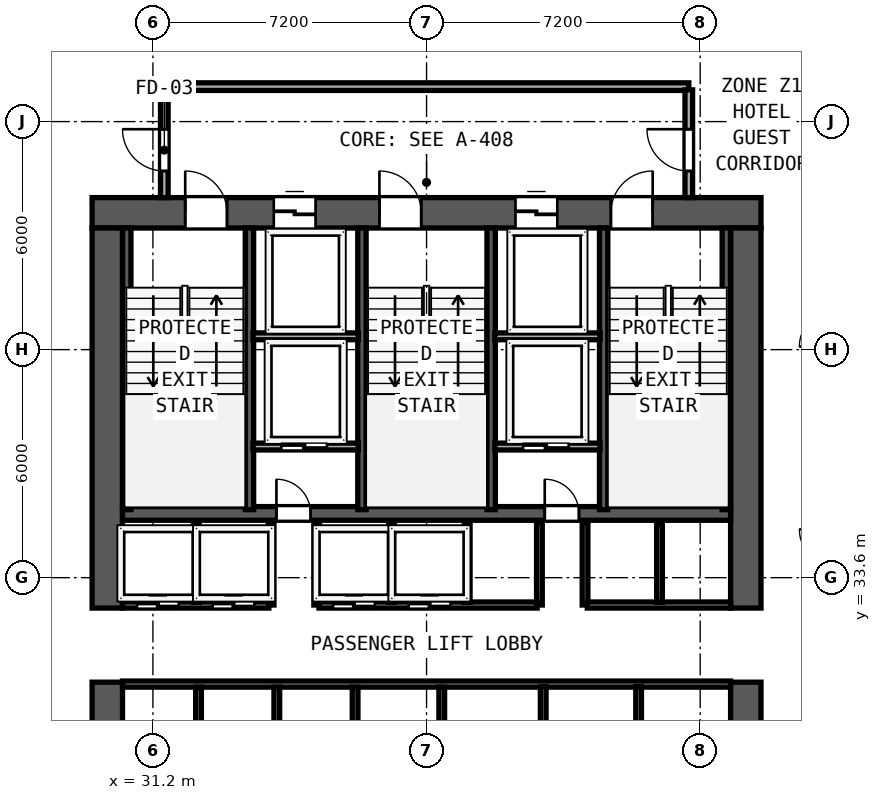
"""IFC4 building model, lengths in metres.
Left out: names, types, materials, properties, quantities, classifications, styles, units other than length and angle.
Written with IfcOpenShell. Run it as: python <this file> out.ifc"""

import sys

from ifc_helpers import new_model, si_unit, direction, frame, frame_2d, origin, place, context, subcontext, project, spatial, rectangle, extrude, element, fill, save


model = new_model("IFC4")
c1 = context("Model", 3, precision=1e-05, world=origin(), true_north=direction((0.0, 1.0)))
c2 = subcontext(c1, "Body", "Model", "MODEL_VIEW")
j1 = project(units=[si_unit("LENGTHUNIT", "METRE"), si_unit("PLANEANGLEUNIT", "RADIAN")], contexts=[c1])
p1 = place(None, origin())
s1 = spatial("IfcSite", under=j1, at=p1, CompositionType="ELEMENT")
p2 = place(p1, origin())
s2 = spatial("IfcBuilding", under=s1, at=p2, CompositionType="ELEMENT")
p3 = place(p2, frame((0.0, 0.0, 62.8)))
s3 = spatial("IfcBuildingStorey", under=s2, at=p3, CompositionType="ELEMENT", Elevation=62.8)
p4 = place(p3, frame((29.6, 43.2, 0.0), z_axis=(0.0, 0.0, 1.0), x_axis=(1.0, 0.0, 0.0)))
e1 = element("IfcWall", 1, at=p4, inside=s3, PredefinedType="SHEAR", context=c2, shape_type="SweptSolid", body=[
    extrude(rectangle(XDim=17.6, YDim=0.8, at=frame_2d((8.8, 0.0))), origin(), (0.0, 0.0, 1.0), 3.6),
])
p5 = place(p4, frame((2.45, 0.0, 0.0)))
e2 = element("IfcOpeningElement", 2, at=p5, cuts=e1, PredefinedType="OPENING", context=c2, shape_type="SweptSolid", body=[
    extrude(rectangle(XDim=1.1, YDim=2.15, at=frame_2d((0.55, 1.075))), frame((0.0, 0.41, 0.0), z_axis=(0.0, -1.0, 0.0), x_axis=(1.0, 0.0, 0.0)), (0.0, 0.0, 1.0), 0.82),
])
p6 = place(p4, frame((7.56, 0.0, 0.0)))
e3 = element("IfcOpeningElement", 3, at=p6, cuts=e1, PredefinedType="OPENING", context=c2, shape_type="SweptSolid", body=[
    extrude(rectangle(XDim=1.1, YDim=2.15, at=frame_2d((0.55, 1.075))), frame((0.0, 0.41, 0.0), z_axis=(0.0, -1.0, 0.0), x_axis=(1.0, 0.0, 0.0)), (0.0, 0.0, 1.0), 0.82),
])
p7 = place(p4, frame((13.65, 0.0, 0.0)))
e4 = element("IfcOpeningElement", 4, at=p7, cuts=e1, PredefinedType="OPENING", context=c2, shape_type="SweptSolid", body=[
    extrude(rectangle(XDim=1.1, YDim=2.15, at=frame_2d((0.55, 1.075))), frame((0.0, 0.41, 0.0), z_axis=(0.0, -1.0, 0.0), x_axis=(1.0, 0.0, 0.0)), (0.0, 0.0, 1.0), 0.82),
])
p8 = place(p4, frame((4.78, 0.0, 0.0)))
e5 = element("IfcOpeningElement", 5, at=p8, cuts=e1, PredefinedType="OPENING", context=c2, shape_type="SweptSolid", body=[
    extrude(rectangle(XDim=1.1, YDim=2.2, at=frame_2d((0.55, 1.1))), frame((0.0, 0.41, 0.0), z_axis=(0.0, -1.0, 0.0), x_axis=(1.0, 0.0, 0.0)), (0.0, 0.0, 1.0), 0.82),
])
p9 = place(p4, frame((11.14, 0.0, 0.0)))
e6 = element("IfcOpeningElement", 6, at=p9, cuts=e1, PredefinedType="OPENING", context=c2, shape_type="SweptSolid", body=[
    extrude(rectangle(XDim=1.1, YDim=2.2, at=frame_2d((0.55, 1.1))), frame((0.0, 0.41, 0.0), z_axis=(0.0, -1.0, 0.0), x_axis=(1.0, 0.0, 0.0)), (0.0, 0.0, 1.0), 0.82),
])
p10 = place(p3, frame((30.0, 26.8, 0.0), z_axis=(0.0, 0.0, 1.0), x_axis=(0.0, 1.0, 0.0)))
e7 = element("IfcWall", 7, at=p10, inside=s3, PredefinedType="SHEAR", context=c2, shape_type="SweptSolid", body=[
    extrude(rectangle(XDim=4.05, YDim=0.8, at=frame_2d((2.025, 0.0))), origin(), (0.0, 0.0, 1.0), 3.6),
])
p11 = place(p3, frame((30.0, 32.8, 0.0), z_axis=(0.0, 0.0, 1.0), x_axis=(0.0, 1.0, 0.0)))
e8 = element("IfcWall", 8, at=p11, inside=s3, PredefinedType="SHEAR", context=c2, shape_type="SweptSolid", body=[
    extrude(rectangle(XDim=10.0, YDim=0.8, at=frame_2d((5.0, 0.0))), origin(), (0.0, 0.0, 1.0), 3.6),
])
p12 = place(p3, frame((46.8, 26.8, 0.0), z_axis=(0.0, 0.0, 1.0), x_axis=(0.0, 1.0, 0.0)))
e9 = element("IfcWall", 9, at=p12, inside=s3, PredefinedType="SHEAR", context=c2, shape_type="SweptSolid", body=[
    extrude(rectangle(XDim=4.05, YDim=0.8, at=frame_2d((2.025, 0.0))), origin(), (0.0, 0.0, 1.0), 3.6),
])
p13 = place(p3, frame((46.8, 32.8, 0.0), z_axis=(0.0, 0.0, 1.0), x_axis=(0.0, 1.0, 0.0)))
e10 = element("IfcWall", 10, at=p13, inside=s3, PredefinedType="SHEAR", context=c2, shape_type="SweptSolid", body=[
    extrude(rectangle(XDim=10.0, YDim=0.8, at=frame_2d((5.0, 0.0))), origin(), (0.0, 0.0, 1.0), 3.6),
])
p14 = place(p3, frame((30.4, 35.29, 0.0), z_axis=(0.0, 0.0, 1.0), x_axis=(1.0, 0.0, 0.0)))
e11 = element("IfcWall", 11, at=p14, inside=s3, PredefinedType="SHEAR", context=c2, shape_type="SweptSolid", body=[
    extrude(rectangle(XDim=16.0, YDim=0.36, at=frame_2d((8.0, 0.0))), origin(), (0.0, 0.0, 1.0), 3.6),
])
p15 = place(p14, frame((4.95, 0.0, 0.0), z_axis=(0.0, 0.0, 1.0), x_axis=(-1.0, 0.0, 0.0)))
e12 = element("IfcOpeningElement", 12, at=p15, cuts=e11, PredefinedType="OPENING", context=c2, shape_type="SweptSolid", body=[
    extrude(rectangle(XDim=0.9, YDim=2.1, at=frame_2d((0.45, 1.05))), frame((0.0, 0.19, 0.0), z_axis=(0.0, -1.0, 0.0), x_axis=(1.0, 0.0, 0.0)), (0.0, 0.0, 1.0), 0.38),
])
p16 = place(p14, frame((12.01, 0.0, 0.0), z_axis=(0.0, 0.0, 1.0), x_axis=(-1.0, 0.0, 0.0)))
e13 = element("IfcOpeningElement", 13, at=p16, cuts=e11, PredefinedType="OPENING", context=c2, shape_type="SweptSolid", body=[
    extrude(rectangle(XDim=0.9, YDim=2.1, at=frame_2d((0.45, 1.05))), frame((0.0, 0.19, 0.0), z_axis=(0.0, -1.0, 0.0), x_axis=(1.0, 0.0, 0.0)), (0.0, 0.0, 1.0), 0.38),
])
for number, where, z_axis, x_axis in (
    (14, (30.512, 35.39, 0.0), (0.0, 0.0, 1.0), (0.0, 1.0, 0.0)),
    (15, (33.74, 35.39, 0.0), (0.0, 0.0, 1.0), (0.0, 1.0, 0.0)),
    (16, (36.7, 35.39, 0.0), (0.0, 0.0, 1.0), (0.0, 1.0, 0.0)),
    (17, (40.1, 35.39, 0.0), (0.0, 0.0, 1.0), (0.0, 1.0, 0.0)),
    (18, (43.06, 35.39, 0.0), (0.0, 0.0, 1.0), (0.0, 1.0, 0.0)),
    (19, (46.288, 35.39, 0.0), (0.0, 0.0, 1.0), (0.0, 1.0, 0.0)),
):
    element("IfcWall", number, at=place(p3, frame(where, z_axis=z_axis, x_axis=x_axis)), inside=s3, PredefinedType="SHEAR", context=c2, shape_type="SweptSolid", body=[
        extrude(rectangle(XDim=7.41, YDim=0.22, at=frame_2d((3.705, 0.0))), origin(), (0.0, 0.0, 1.0), 3.6),
    ])
p17 = place(p3, frame((31.5, 46.52, 0.0), z_axis=(0.0, 0.0, 1.0), x_axis=(1.0, 0.0, 0.0)))
e20 = element("IfcWall", 20, at=p17, inside=s3, PredefinedType="SOLIDWALL", context=c2, shape_type="SweptSolid", body=[
    extrude(rectangle(XDim=13.8, YDim=0.2, at=frame_2d((6.9, 0.0))), origin(), (0.0, 0.0, 1.0), 3.6),
])
p18 = place(p3, frame((31.5, 43.6, 0.0), z_axis=(0.0, 0.0, 1.0), x_axis=(0.0, 1.0, 0.0)))
e21 = element("IfcWall", 21, at=p18, inside=s3, PredefinedType="SOLIDWALL", context=c2, shape_type="SweptSolid", body=[
    extrude(rectangle(XDim=2.835, YDim=0.2, at=frame_2d((1.417, 0.0))), origin(), (0.0, 0.0, 1.0), 3.6),
])
p19 = place(p18, frame((1.8, 0.0, 0.0), z_axis=(0.0, 0.0, 1.0), x_axis=(-1.0, 0.0, 0.0)))
e22 = element("IfcOpeningElement", 22, at=p19, cuts=e21, PredefinedType="OPENING", context=c2, shape_type="SweptSolid", body=[
    extrude(rectangle(XDim=1.1, YDim=2.15, at=frame_2d((0.55, 1.075))), frame((0.0, 0.11, 0.0), z_axis=(0.0, -1.0, 0.0), x_axis=(1.0, 0.0, 0.0)), (0.0, 0.0, 1.0), 0.22),
])
p20 = place(p3, frame((45.3, 43.6, 0.0), z_axis=(0.0, 0.0, 1.0), x_axis=(0.0, 1.0, 0.0)))
e23 = element("IfcWall", 23, at=p20, inside=s3, PredefinedType="SOLIDWALL", context=c2, shape_type="SweptSolid", body=[
    extrude(rectangle(XDim=2.835, YDim=0.2, at=frame_2d((1.417, 0.0))), origin(), (0.0, 0.0, 1.0), 3.6),
])
p21 = place(p20, frame((0.7, 0.0, 0.0)))
e24 = element("IfcOpeningElement", 24, at=p21, cuts=e23, PredefinedType="OPENING", context=c2, shape_type="SweptSolid", body=[
    extrude(rectangle(XDim=1.1, YDim=2.15, at=frame_2d((0.55, 1.075))), frame((0.0, 0.11, 0.0), z_axis=(0.0, -1.0, 0.0), x_axis=(1.0, 0.0, 0.0)), (0.0, 0.0, 1.0), 0.22),
])
for number, where, z_axis, x_axis in (
    (25, (33.835, 39.95, 0.0), (0.0, 0.0, 1.0), (1.0, 0.0, 0.0)),
    (26, (40.195, 39.95, 0.0), (0.0, 0.0, 1.0), (1.0, 0.0, 0.0)),
):
    element("IfcWall", number, at=place(p3, frame(where, z_axis=z_axis, x_axis=x_axis)), inside=s3, PredefinedType="SOLIDWALL", context=c2, shape_type="SweptSolid", body=[
        extrude(rectangle(XDim=2.77, YDim=0.18, at=frame_2d((1.385, 0.0))), origin(), (0.0, 0.0, 1.0), 3.6),
    ])
p22 = place(p3, frame((33.835, 37.05, 0.0), z_axis=(0.0, 0.0, 1.0), x_axis=(1.0, 0.0, 0.0)))
e27 = element("IfcWall", 27, at=p22, inside=s3, PredefinedType="SOLIDWALL", context=c2, shape_type="SweptSolid", body=[
    extrude(rectangle(XDim=2.77, YDim=0.18, at=frame_2d((1.385, 0.0))), origin(), (0.0, 0.0, 1.0), 3.6),
])
p23 = place(p22, frame((1.945, 0.0, 0.0), z_axis=(0.0, 0.0, 1.0), x_axis=(-1.0, 0.0, 0.0)))
e28 = element("IfcOpeningElement", 28, at=p23, cuts=e27, PredefinedType="OPENING", context=c2, shape_type="SweptSolid", body=[
    extrude(rectangle(XDim=1.2, YDim=2.2, at=frame_2d((0.6, 1.1))), frame((0.0, 0.1, 0.0), z_axis=(0.0, -1.0, 0.0), x_axis=(1.0, 0.0, 0.0)), (0.0, 0.0, 1.0), 0.2),
])
for number, where, z_axis, x_axis in (
    (29, (34.31, 32.88, 0.0), (0.0, 0.0, 1.0), (0.0, 1.0, 0.0)),
    (30, (35.51, 32.88, 0.0), (0.0, 0.0, 1.0), (0.0, 1.0, 0.0)),
):
    element("IfcWall", number, at=place(p3, frame(where, z_axis=z_axis, x_axis=x_axis)), inside=s3, PredefinedType="SOLIDWALL", context=c2, shape_type="SweptSolid", body=[
        extrude(rectangle(XDim=2.17, YDim=0.15, at=frame_2d((1.085, 0.0))), origin(), (0.0, 0.0, 1.0), 3.6),
    ])
p24 = place(p3, frame((40.195, 37.05, 0.0), z_axis=(0.0, 0.0, 1.0), x_axis=(1.0, 0.0, 0.0)))
e31 = element("IfcWall", 31, at=p24, inside=s3, PredefinedType="SOLIDWALL", context=c2, shape_type="SweptSolid", body=[
    extrude(rectangle(XDim=2.77, YDim=0.18, at=frame_2d((1.385, 0.0))), origin(), (0.0, 0.0, 1.0), 3.6),
])
p25 = place(p24, frame((1.945, 0.0, 0.0), z_axis=(0.0, 0.0, 1.0), x_axis=(-1.0, 0.0, 0.0)))
e32 = element("IfcOpeningElement", 32, at=p25, cuts=e31, PredefinedType="OPENING", context=c2, shape_type="SweptSolid", body=[
    extrude(rectangle(XDim=1.2, YDim=2.2, at=frame_2d((0.6, 1.1))), frame((0.0, 0.1, 0.0), z_axis=(0.0, -1.0, 0.0), x_axis=(1.0, 0.0, 0.0)), (0.0, 0.0, 1.0), 0.2),
])
for number, where, z_axis, x_axis in (
    (33, (41.37, 32.88, 0.0), (0.0, 0.0, 1.0), (0.0, 1.0, 0.0)),
    (34, (42.57, 32.88, 0.0), (0.0, 0.0, 1.0), (0.0, 1.0, 0.0)),
):
    element("IfcWall", number, at=place(p3, frame(where, z_axis=z_axis, x_axis=x_axis)), inside=s3, PredefinedType="SOLIDWALL", context=c2, shape_type="SweptSolid", body=[
        extrude(rectangle(XDim=2.17, YDim=0.15, at=frame_2d((1.085, 0.0))), origin(), (0.0, 0.0, 1.0), 3.6),
    ])
p26 = place(p3, frame((30.4, 32.88, 0.0), z_axis=(0.0, 0.0, 1.0), x_axis=(1.0, 0.0, 0.0)))
e35 = element("IfcWall", 35, at=p26, inside=s3, PredefinedType="SOLIDWALL", context=c2, shape_type="SweptSolid", body=[
    extrude(rectangle(XDim=3.85, YDim=0.16, at=frame_2d((1.925, 0.0))), origin(), (0.0, 0.0, 1.0), 3.6),
])
p27 = place(p26, frame((1.48, 0.0, 0.0), z_axis=(0.0, 0.0, 1.0), x_axis=(-1.0, 0.0, 0.0)))
e36 = element("IfcOpeningElement", 36, at=p27, cuts=e35, PredefinedType="OPENING", context=c2, shape_type="SweptSolid", body=[
    extrude(rectangle(XDim=1.1, YDim=2.2, at=frame_2d((0.55, 1.1))), frame((0.0, 0.09, 0.0), z_axis=(0.0, -1.0, 0.0), x_axis=(1.0, 0.0, 0.0)), (0.0, 0.0, 1.0), 0.18),
])
p28 = place(p26, frame((3.47, 0.0, 0.0), z_axis=(0.0, 0.0, 1.0), x_axis=(-1.0, 0.0, 0.0)))
e37 = element("IfcOpeningElement", 37, at=p28, cuts=e35, PredefinedType="OPENING", context=c2, shape_type="SweptSolid", body=[
    extrude(rectangle(XDim=1.1, YDim=2.2, at=frame_2d((0.55, 1.1))), frame((0.0, 0.09, 0.0), z_axis=(0.0, -1.0, 0.0), x_axis=(1.0, 0.0, 0.0)), (0.0, 0.0, 1.0), 0.18),
])
p29 = place(p3, frame((35.57, 32.88, 0.0), z_axis=(0.0, 0.0, 1.0), x_axis=(1.0, 0.0, 0.0)))
e38 = element("IfcWall", 38, at=p29, inside=s3, PredefinedType="SOLIDWALL", context=c2, shape_type="SweptSolid", body=[
    extrude(rectangle(XDim=5.74, YDim=0.16, at=frame_2d((2.87, 0.0))), origin(), (0.0, 0.0, 1.0), 3.6),
])
p30 = place(p29, frame((1.47, 0.0, 0.0), z_axis=(0.0, 0.0, 1.0), x_axis=(-1.0, 0.0, 0.0)))
e39 = element("IfcOpeningElement", 39, at=p30, cuts=e38, PredefinedType="OPENING", context=c2, shape_type="SweptSolid", body=[
    extrude(rectangle(XDim=1.1, YDim=2.2, at=frame_2d((0.55, 1.1))), frame((0.0, 0.09, 0.0), z_axis=(0.0, -1.0, 0.0), x_axis=(1.0, 0.0, 0.0)), (0.0, 0.0, 1.0), 0.18),
])
p31 = place(p29, frame((3.46, 0.0, 0.0), z_axis=(0.0, 0.0, 1.0), x_axis=(-1.0, 0.0, 0.0)))
e40 = element("IfcOpeningElement", 40, at=p31, cuts=e38, PredefinedType="OPENING", context=c2, shape_type="SweptSolid", body=[
    extrude(rectangle(XDim=1.1, YDim=2.2, at=frame_2d((0.55, 1.1))), frame((0.0, 0.09, 0.0), z_axis=(0.0, -1.0, 0.0), x_axis=(1.0, 0.0, 0.0)), (0.0, 0.0, 1.0), 0.18),
])
p32 = place(p3, frame((42.63, 32.88, 0.0), z_axis=(0.0, 0.0, 1.0), x_axis=(1.0, 0.0, 0.0)))
e41 = element("IfcWall", 41, at=p32, inside=s3, PredefinedType="SOLIDWALL", context=c2, shape_type="SweptSolid", body=[
    extrude(rectangle(XDim=3.77, YDim=0.16, at=frame_2d((1.885, 0.0))), origin(), (0.0, 0.0, 1.0), 3.6),
])
for number, where, z_axis, x_axis in (
    (42, (32.34, 32.95, 0.0), (0.0, 0.0, 1.0), (0.0, 1.0, 0.0)),
    (43, (37.48, 32.95, 0.0), (0.0, 0.0, 1.0), (0.0, 1.0, 0.0)),
    (44, (39.47, 32.95, 0.0), (0.0, 0.0, 1.0), (0.0, 1.0, 0.0)),
    (45, (44.53, 32.95, 0.0), (0.0, 0.0, 1.0), (0.0, 1.0, 0.0)),
):
    element("IfcWall", number, at=place(p3, frame(where, z_axis=z_axis, x_axis=x_axis)), inside=s3, PredefinedType="SOLIDWALL", context=c2, shape_type="SweptSolid", body=[
        extrude(rectangle(XDim=2.05, YDim=0.15, at=frame_2d((1.025, 0.0))), origin(), (0.0, 0.0, 1.0), 3.6),
    ])
p33 = place(p3, frame((30.4, 30.8, 0.0), z_axis=(0.0, 0.0, 1.0), x_axis=(1.0, 0.0, 0.0)))
e46 = element("IfcWall", 46, at=p33, inside=s3, PredefinedType="SOLIDWALL", context=c2, shape_type="SweptSolid", body=[
    extrude(rectangle(XDim=16.0, YDim=0.16, at=frame_2d((8.0, 0.0))), origin(), (0.0, 0.0, 1.0), 3.6),
])
for number, where, z_axis, x_axis in (
    (47, (32.4, 28.735, 0.0), (0.0, 0.0, 1.0), (0.0, 1.0, 0.0)),
    (48, (34.46, 28.735, 0.0), (0.0, 0.0, 1.0), (0.0, 1.0, 0.0)),
    (49, (36.52, 28.735, 0.0), (0.0, 0.0, 1.0), (0.0, 1.0, 0.0)),
    (50, (38.8, 28.735, 0.0), (0.0, 0.0, 1.0), (0.0, 1.0, 0.0)),
):
    element("IfcWall", number, at=place(p3, frame(where, z_axis=z_axis, x_axis=x_axis)), inside=s3, PredefinedType="SOLIDWALL", context=c2, shape_type="SweptSolid", body=[
        extrude(rectangle(XDim=1.985, YDim=0.15, at=frame_2d((0.992, 0.0))), origin(), (0.0, 0.0, 1.0), 3.6),
    ])
for number, where, z_axis, x_axis in (
    (51, (41.47, 28.75, 0.0), (0.0, 0.0, 1.0), (0.0, 1.0, 0.0)),
    (52, (43.98, 28.75, 0.0), (0.0, 0.0, 1.0), (0.0, 1.0, 0.0)),
):
    element("IfcWall", number, at=place(p3, frame(where, z_axis=z_axis, x_axis=x_axis)), inside=s3, PredefinedType="SOLIDWALL", context=c2, shape_type="SweptSolid", body=[
        extrude(rectangle(XDim=1.985, YDim=0.15, at=frame_2d((0.993, 0.0))), origin(), (0.0, 0.0, 1.0), 3.6),
    ])
p34 = place(p5, origin())
e53 = element("IfcDoor", 53, at=p34, inside=s3, OperationType="SINGLE_SWING_LEFT", PredefinedType="DOOR", context=c2, shape_type="SweptSolid", body=[
    extrude(rectangle(XDim=1.1, YDim=2.15, at=frame_2d((0.55, 1.075))), frame((0.0, 0.185, 0.0), z_axis=(0.0, -1.0, 0.0), x_axis=(1.0, 0.0, 0.0)), (0.0, 0.0, 1.0), 0.05),
])
fill(e2, e53)
p35 = place(p6, origin())
e54 = element("IfcDoor", 54, at=p35, inside=s3, OperationType="SINGLE_SWING_LEFT", PredefinedType="DOOR", context=c2, shape_type="SweptSolid", body=[
    extrude(rectangle(XDim=1.1, YDim=2.15, at=frame_2d((0.55, 1.075))), frame((0.0, 0.185, 0.0), z_axis=(0.0, -1.0, 0.0), x_axis=(1.0, 0.0, 0.0)), (0.0, 0.0, 1.0), 0.05),
])
fill(e3, e54)
p36 = place(p7, origin())
e55 = element("IfcDoor", 55, at=p36, inside=s3, OperationType="SINGLE_SWING_RIGHT", PredefinedType="DOOR", context=c2, shape_type="SweptSolid", body=[
    extrude(rectangle(XDim=1.1, YDim=2.15, at=frame_2d((0.55, 1.075))), frame((0.0, 0.185, 0.0), z_axis=(0.0, -1.0, 0.0), x_axis=(1.0, 0.0, 0.0)), (0.0, 0.0, 1.0), 0.05),
])
fill(e4, e55)
p37 = place(p19, origin())
e56 = element("IfcDoor", 56, at=p37, inside=s3, OperationType="SINGLE_SWING_LEFT", PredefinedType="DOOR", context=c2, shape_type="SweptSolid", body=[
    extrude(rectangle(XDim=1.1, YDim=2.15, at=frame_2d((0.55, 1.075))), frame((0.0, 0.025, 0.0), z_axis=(0.0, -1.0, 0.0), x_axis=(1.0, 0.0, 0.0)), (0.0, 0.0, 1.0), 0.05),
])
fill(e22, e56)
p38 = place(p21, origin())
e57 = element("IfcDoor", 57, at=p38, inside=s3, OperationType="SINGLE_SWING_RIGHT", PredefinedType="DOOR", context=c2, shape_type="SweptSolid", body=[
    extrude(rectangle(XDim=1.1, YDim=2.15, at=frame_2d((0.55, 1.075))), frame((0.0, 0.025, 0.0), z_axis=(0.0, -1.0, 0.0), x_axis=(1.0, 0.0, 0.0)), (0.0, 0.0, 1.0), 0.05),
])
fill(e24, e57)
p39 = place(p8, origin())
e58 = element("IfcDoor", 58, at=p39, inside=s3, OperationType="SLIDING_TO_LEFT", PredefinedType="DOOR", context=c2, shape_type="SweptSolid", body=[
    extrude(rectangle(XDim=1.1, YDim=2.2, at=frame_2d((0.55, 1.1))), frame((0.0, 0.185, 0.0), z_axis=(0.0, -1.0, 0.0), x_axis=(1.0, 0.0, 0.0)), (0.0, 0.0, 1.0), 0.05),
])
fill(e5, e58)
p40 = place(p9, origin())
e59 = element("IfcDoor", 59, at=p40, inside=s3, OperationType="SLIDING_TO_LEFT", PredefinedType="DOOR", context=c2, shape_type="SweptSolid", body=[
    extrude(rectangle(XDim=1.1, YDim=2.2, at=frame_2d((0.55, 1.1))), frame((0.0, 0.185, 0.0), z_axis=(0.0, -1.0, 0.0), x_axis=(1.0, 0.0, 0.0)), (0.0, 0.0, 1.0), 0.05),
])
fill(e6, e59)
p41 = place(p23, origin())
e60 = element("IfcDoor", 60, at=p41, inside=s3, OperationType="SLIDING_TO_RIGHT", PredefinedType="DOOR", context=c2, shape_type="SweptSolid", body=[
    extrude(rectangle(XDim=1.2, YDim=2.2, at=frame_2d((0.6, 1.1))), frame((0.0, 0.025, 0.0), z_axis=(0.0, -1.0, 0.0), x_axis=(1.0, 0.0, 0.0)), (0.0, 0.0, 1.0), 0.05),
])
fill(e28, e60)
p42 = place(p15, origin())
e61 = element("IfcDoor", 61, at=p42, inside=s3, OperationType="SINGLE_SWING_RIGHT", PredefinedType="DOOR", context=c2, shape_type="SweptSolid", body=[
    extrude(rectangle(XDim=0.9, YDim=2.1, at=frame_2d((0.45, 1.05))), frame((0.0, 0.025, 0.0), z_axis=(0.0, -1.0, 0.0), x_axis=(1.0, 0.0, 0.0)), (0.0, 0.0, 1.0), 0.05),
])
fill(e12, e61)
p43 = place(p25, origin())
e62 = element("IfcDoor", 62, at=p43, inside=s3, OperationType="SLIDING_TO_RIGHT", PredefinedType="DOOR", context=c2, shape_type="SweptSolid", body=[
    extrude(rectangle(XDim=1.2, YDim=2.2, at=frame_2d((0.6, 1.1))), frame((0.0, 0.025, 0.0), z_axis=(0.0, -1.0, 0.0), x_axis=(1.0, 0.0, 0.0)), (0.0, 0.0, 1.0), 0.05),
])
fill(e32, e62)
p44 = place(p16, origin())
e63 = element("IfcDoor", 63, at=p44, inside=s3, OperationType="SINGLE_SWING_RIGHT", PredefinedType="DOOR", context=c2, shape_type="SweptSolid", body=[
    extrude(rectangle(XDim=0.9, YDim=2.1, at=frame_2d((0.45, 1.05))), frame((0.0, 0.025, 0.0), z_axis=(0.0, -1.0, 0.0), x_axis=(1.0, 0.0, 0.0)), (0.0, 0.0, 1.0), 0.05),
])
fill(e13, e63)
p45 = place(p27, origin())
e64 = element("IfcDoor", 64, at=p45, inside=s3, OperationType="SLIDING_TO_LEFT", PredefinedType="DOOR", context=c2, shape_type="SweptSolid", body=[
    extrude(rectangle(XDim=1.1, YDim=2.2, at=frame_2d((0.55, 1.1))), frame((0.0, 0.025, 0.0), z_axis=(0.0, -1.0, 0.0), x_axis=(1.0, 0.0, 0.0)), (0.0, 0.0, 1.0), 0.05),
])
fill(e36, e64)
p46 = place(p28, origin())
e65 = element("IfcDoor", 65, at=p46, inside=s3, OperationType="SLIDING_TO_LEFT", PredefinedType="DOOR", context=c2, shape_type="SweptSolid", body=[
    extrude(rectangle(XDim=1.1, YDim=2.2, at=frame_2d((0.55, 1.1))), frame((0.0, 0.025, 0.0), z_axis=(0.0, -1.0, 0.0), x_axis=(1.0, 0.0, 0.0)), (0.0, 0.0, 1.0), 0.05),
])
fill(e37, e65)
p47 = place(p30, origin())
e66 = element("IfcDoor", 66, at=p47, inside=s3, OperationType="SLIDING_TO_LEFT", PredefinedType="DOOR", context=c2, shape_type="SweptSolid", body=[
    extrude(rectangle(XDim=1.1, YDim=2.2, at=frame_2d((0.55, 1.1))), frame((0.0, 0.025, 0.0), z_axis=(0.0, -1.0, 0.0), x_axis=(1.0, 0.0, 0.0)), (0.0, 0.0, 1.0), 0.05),
])
fill(e39, e66)
p48 = place(p31, origin())
e67 = element("IfcDoor", 67, at=p48, inside=s3, OperationType="SLIDING_TO_LEFT", PredefinedType="DOOR", context=c2, shape_type="SweptSolid", body=[
    extrude(rectangle(XDim=1.1, YDim=2.2, at=frame_2d((0.55, 1.1))), frame((0.0, 0.025, 0.0), z_axis=(0.0, -1.0, 0.0), x_axis=(1.0, 0.0, 0.0)), (0.0, 0.0, 1.0), 0.05),
])
fill(e40, e67)
save(model, sys.argv[1])
